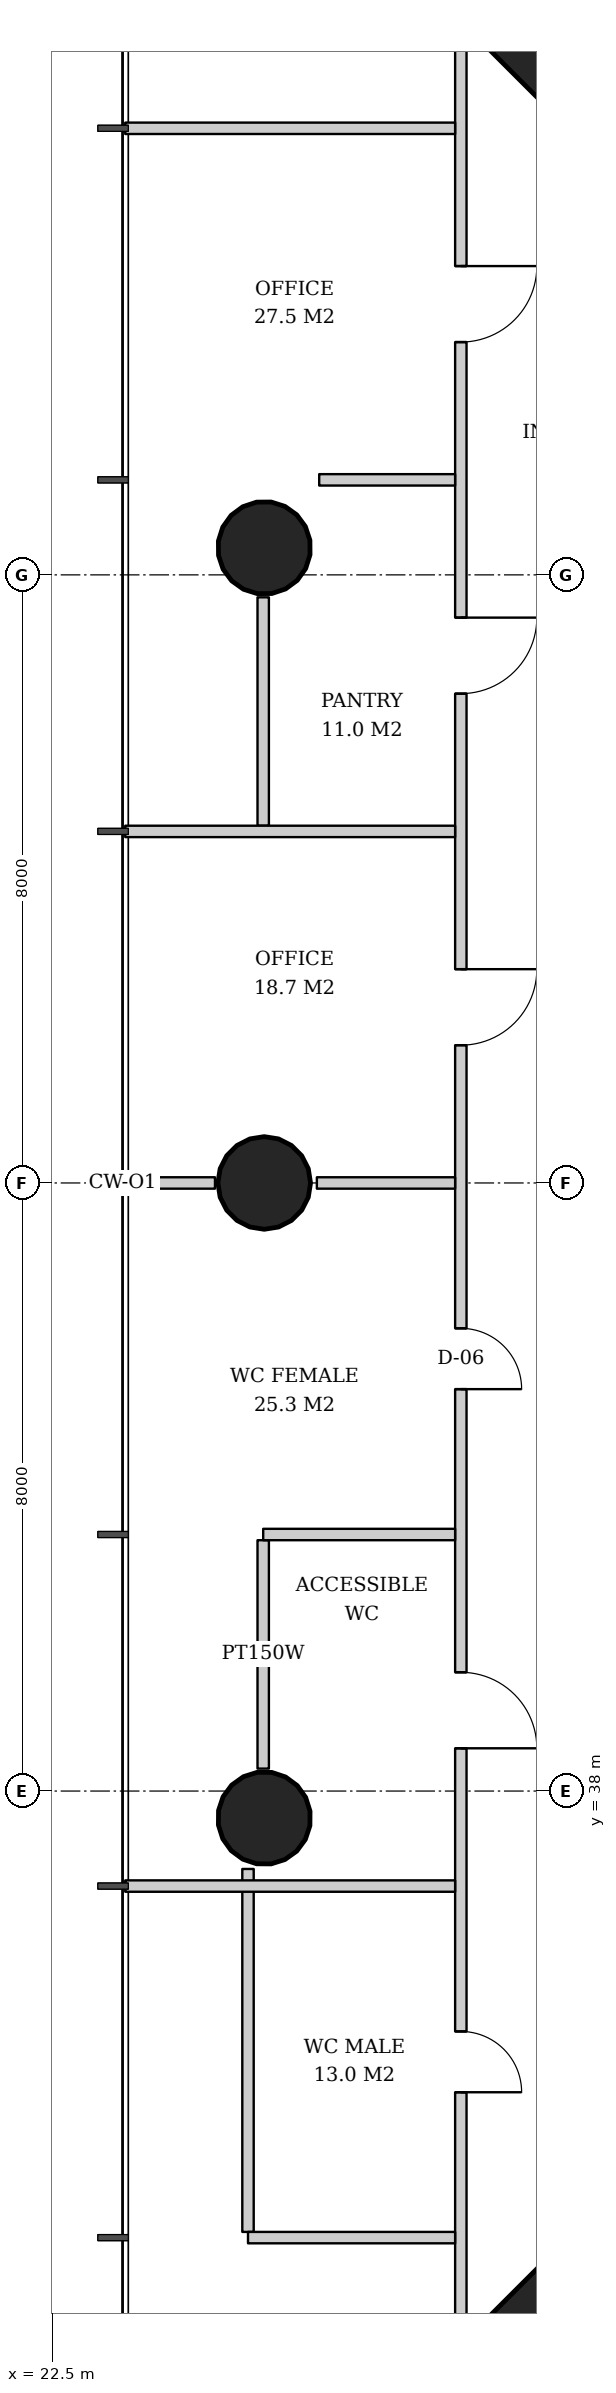
"""IFC4 building model, lengths in metres.
Left out: names, types, materials, properties, quantities, classifications, styles, units other than length and angle.
Written with IfcOpenShell. Run it as: python <this file> out.ifc"""

import sys

from ifc_helpers import new_model, si_unit, direction, frame, frame_2d, origin, origin_2d, place, context, subcontext, project, spatial, rectangle, hollow_circle, extrude, element, fill, save


model = new_model("IFC4")
c1 = context("Model", 3, precision=1e-05, world=origin(), true_north=direction((0.0, 1.0)))
c2 = subcontext(c1, "Body", "Model", "MODEL_VIEW")
j1 = project(units=[si_unit("LENGTHUNIT", "METRE"), si_unit("PLANEANGLEUNIT", "RADIAN")], contexts=[c1])
p1 = place(None, origin())
s1 = spatial("IfcSite", under=j1, at=p1, CompositionType="ELEMENT")
p2 = place(p1, origin())
s2 = spatial("IfcBuilding", under=s1, at=p2, CompositionType="ELEMENT")
p3 = place(p2, frame((0.0, 0.0, 154.0)))
s3 = spatial("IfcBuildingStorey", under=s2, at=p3, CompositionType="ELEMENT", Elevation=154.0)
for number, where, z_axis, x_axis in (
    (1, (29.35, 61.65, 0.0), (0.032, -0.032, 0.999), (0.707, 0.707, 0.0)),
    (2, (29.35, 30.35, 0.0), (0.032, 0.032, 0.999), (-0.707, 0.707, 0.0)),
):
    element("IfcColumn", number, at=place(p3, frame(where, z_axis=z_axis, x_axis=x_axis)), inside=s3, PredefinedType="COLUMN", context=c2, shape_type="SweptSolid", body=[
        extrude(rectangle(XDim=2.6, YDim=2.6, at=origin_2d()), origin(), (0.0, 0.0, 1.0), 3.804),
    ])
p4 = place(p3, frame((25.25, 54.375, 0.0), z_axis=(0.031910269556, -0.015987237665, 0.999362868496), x_axis=(0.447933021895, 0.894067115991, 0.0)))
e3 = element("IfcColumn", 3, at=p4, inside=s3, PredefinedType="COLUMN", context=c2, shape_type="SweptSolid", body=[
    extrude(hollow_circle(Radius=0.61, WallThickness=0.04, at=origin_2d()), origin(), (0.0, 0.0, 1.0), 3.802),
])
p5 = place(p3, frame((25.25, 46.0, 0.0), z_axis=(0.031914348339, 0.0, 0.999490607445), x_axis=(0.0, 1.0, 0.0)))
e4 = element("IfcColumn", 4, at=p5, inside=s3, PredefinedType="COLUMN", context=c2, shape_type="SweptSolid", body=[
    extrude(hollow_circle(Radius=0.61, WallThickness=0.04, at=origin_2d()), origin(), (0.0, 0.0, 1.0), 3.802),
])
p6 = place(p3, frame((25.25, 37.625, 0.0), z_axis=(0.031910269556, 0.015987237665, 0.999362868496), x_axis=(-0.447933021895, 0.894067115991, 0.0)))
e5 = element("IfcColumn", 5, at=p6, inside=s3, PredefinedType="COLUMN", context=c2, shape_type="SweptSolid", body=[
    extrude(hollow_circle(Radius=0.61, WallThickness=0.04, at=origin_2d()), origin(), (0.0, 0.0, 1.0), 3.802),
])
for number, where, z_axis, x_axis in (
    (6, (25.275, 53.705, 0.0), (0.0, 0.0, 1.0), (0.0, -1.0, 0.0)),
    (7, (25.275, 41.3, 0.0), (0.0, 0.0, 1.0), (0.0, -1.0, 0.0)),
):
    element("IfcWall", number, at=place(p3, frame(where, z_axis=z_axis, x_axis=x_axis)), inside=s3, PredefinedType="PARTITIONING", context=c2, shape_type="SweptSolid", body=[
        extrude(rectangle(XDim=3.005, YDim=0.15, at=frame_2d((1.502, 0.0))), origin(), (0.0, 0.0, 1.0), 3.52),
    ])
p7 = place(p3, frame((25.075, 36.975, 0.0), z_axis=(0.0, 0.0, 1.0), x_axis=(0.0, -1.0, 0.0)))
e8 = element("IfcWall", 8, at=p7, inside=s3, PredefinedType="PARTITIONING", context=c2, shape_type="SweptSolid", body=[
    extrude(rectangle(XDim=4.775, YDim=0.15, at=frame_2d((2.388, 0.0))), origin(), (0.0, 0.0, 1.0), 3.52),
])
p8 = place(p3, frame((27.875, 61.211, 0.0), z_axis=(0.0, 0.0, 1.0), x_axis=(0.0, -1.0, 0.0)))
e9 = element("IfcWall", 9, at=p8, inside=s3, PredefinedType="PARTITIONING", context=c2, shape_type="SweptSolid", body=[
    extrude(rectangle(XDim=30.423, YDim=0.15, at=frame_2d((15.211, 0.0))), origin(), (0.0, 0.0, 1.0), 2.706),
])
p9 = place(p8, frame((3.149, 0.0, 0.0)))
e10 = element("IfcOpeningElement", 10, at=p9, cuts=e9, PredefinedType="OPENING", context=c2, shape_type="SweptSolid", body=[
    extrude(rectangle(XDim=1.0, YDim=2.1, at=frame_2d((0.5, 1.05))), frame((0.0, 0.085, 0.0), z_axis=(0.0, -1.0, 0.0), x_axis=(1.0, 0.0, 0.0)), (0.0, 0.0, 1.0), 0.17),
])
p10 = place(p8, frame((7.774, 0.0, 0.0)))
e11 = element("IfcOpeningElement", 11, at=p10, cuts=e9, PredefinedType="OPENING", context=c2, shape_type="SweptSolid", body=[
    extrude(rectangle(XDim=1.0, YDim=2.1, at=frame_2d((0.5, 1.05))), frame((0.0, 0.085, 0.0), z_axis=(0.0, -1.0, 0.0), x_axis=(1.0, 0.0, 0.0)), (0.0, 0.0, 1.0), 0.17),
])
p11 = place(p8, frame((12.399, 0.0, 0.0)))
e12 = element("IfcOpeningElement", 12, at=p11, cuts=e9, PredefinedType="OPENING", context=c2, shape_type="SweptSolid", body=[
    extrude(rectangle(XDim=1.0, YDim=2.1, at=frame_2d((0.5, 1.05))), frame((0.0, 0.085, 0.0), z_axis=(0.0, -1.0, 0.0), x_axis=(1.0, 0.0, 0.0)), (0.0, 0.0, 1.0), 0.17),
])
p12 = place(p8, frame((17.124, 0.0, 0.0)))
e13 = element("IfcOpeningElement", 13, at=p12, cuts=e9, PredefinedType="OPENING", context=c2, shape_type="SweptSolid", body=[
    extrude(rectangle(XDim=0.8, YDim=2.1, at=frame_2d((0.4, 1.05))), frame((0.0, 0.085, 0.0), z_axis=(0.0, -1.0, 0.0), x_axis=(1.0, 0.0, 0.0)), (0.0, 0.0, 1.0), 0.17),
])
p13 = place(p8, frame((21.649, 0.0, 0.0)))
e14 = element("IfcOpeningElement", 14, at=p13, cuts=e9, PredefinedType="OPENING", context=c2, shape_type="SweptSolid", body=[
    extrude(rectangle(XDim=1.0, YDim=2.1, at=frame_2d((0.5, 1.05))), frame((0.0, 0.085, 0.0), z_axis=(0.0, -1.0, 0.0), x_axis=(1.0, 0.0, 0.0)), (0.0, 0.0, 1.0), 0.17),
])
p14 = place(p8, frame((26.374, 0.0, 0.0)))
e15 = element("IfcOpeningElement", 15, at=p14, cuts=e9, PredefinedType="OPENING", context=c2, shape_type="SweptSolid", body=[
    extrude(rectangle(XDim=0.8, YDim=2.1, at=frame_2d((0.4, 1.05))), frame((0.0, 0.085, 0.0), z_axis=(0.0, -1.0, 0.0), x_axis=(1.0, 0.0, 0.0)), (0.0, 0.0, 1.0), 0.17),
])
p15 = place(p3, frame((27.8, 59.875, 0.0), z_axis=(0.0, 0.0, 1.0), x_axis=(-1.0, 0.0, 0.0)))
e16 = element("IfcWall", 16, at=p15, inside=s3, PredefinedType="PARTITIONING", context=c2, shape_type="SweptSolid", body=[
    extrude(rectangle(XDim=4.34, YDim=0.15, at=frame_2d((2.17, 0.0))), origin(), (0.0, 0.0, 1.0), 3.12),
])
p16 = place(p3, frame((27.8, 55.25, 0.0), z_axis=(0.0, 0.0, 1.0), x_axis=(-1.0, 0.0, 0.0)))
e17 = element("IfcWall", 17, at=p16, inside=s3, PredefinedType="PARTITIONING", context=c2, shape_type="SweptSolid", body=[
    extrude(rectangle(XDim=1.788, YDim=0.15, at=frame_2d((0.894, 0.0))), origin(), (0.0, 0.0, 1.0), 3.52),
])
p17 = place(p3, frame((27.8, 50.625, 0.0), z_axis=(0.0, 0.0, 1.0), x_axis=(-1.0, 0.0, 0.0)))
e18 = element("IfcWall", 18, at=p17, inside=s3, PredefinedType="PARTITIONING", context=c2, shape_type="SweptSolid", body=[
    extrude(rectangle(XDim=4.34, YDim=0.15, at=frame_2d((2.17, 0.0))), origin(), (0.0, 0.0, 1.0), 2.706),
])
p18 = place(p3, frame((27.8, 46.0, 0.0), z_axis=(0.0, 0.0, 1.0), x_axis=(-1.0, 0.0, 0.0)))
e19 = element("IfcWall", 19, at=p18, inside=s3, PredefinedType="PARTITIONING", context=c2, shape_type="SweptSolid", body=[
    extrude(rectangle(XDim=1.819, YDim=0.15, at=frame_2d((0.91, 0.0))), origin(), (0.0, 0.0, 1.0), 3.52),
])
p19 = place(p3, frame((24.64, 46.0, 0.0), z_axis=(0.0, 0.0, 1.0), x_axis=(-1.0, 0.0, 0.0)))
e20 = element("IfcWall", 20, at=p19, inside=s3, PredefinedType="PARTITIONING", context=c2, shape_type="SweptSolid", body=[
    extrude(rectangle(XDim=1.18, YDim=0.15, at=frame_2d((0.59, 0.0))), origin(), (0.0, 0.0, 1.0), 3.52),
])
p20 = place(p3, frame((27.8, 41.375, 0.0), z_axis=(0.0, 0.0, 1.0), x_axis=(-1.0, 0.0, 0.0)))
e21 = element("IfcWall", 21, at=p20, inside=s3, PredefinedType="PARTITIONING", context=c2, shape_type="SweptSolid", body=[
    extrude(rectangle(XDim=2.525, YDim=0.15, at=frame_2d((1.263, 0.0))), origin(), (0.0, 0.0, 1.0), 3.52),
])
p21 = place(p3, frame((27.8, 36.75, 0.0), z_axis=(0.0, 0.0, 1.0), x_axis=(-1.0, 0.0, 0.0)))
e22 = element("IfcWall", 22, at=p21, inside=s3, PredefinedType="PARTITIONING", context=c2, shape_type="SweptSolid", body=[
    extrude(rectangle(XDim=4.34, YDim=0.15, at=frame_2d((2.17, 0.0))), origin(), (0.0, 0.0, 1.0), 3.52),
])
p22 = place(p3, frame((27.8, 32.125, 0.0), z_axis=(0.0, 0.0, 1.0), x_axis=(-1.0, 0.0, 0.0)))
e23 = element("IfcWall", 23, at=p22, inside=s3, PredefinedType="PARTITIONING", context=c2, shape_type="SweptSolid", body=[
    extrude(rectangle(XDim=2.725, YDim=0.15, at=frame_2d((1.363, 0.0))), origin(), (0.0, 0.0, 1.0), 3.52),
])
p23 = place(p9, origin())
e24 = element("IfcDoor", 24, at=p23, inside=s3, OperationType="SINGLE_SWING_LEFT", PredefinedType="DOOR", context=c2, shape_type="SweptSolid", body=[
    extrude(rectangle(XDim=1.0, YDim=2.1, at=frame_2d((0.5, 1.05))), frame((0.0, 0.025, 0.0), z_axis=(0.0, -1.0, 0.0), x_axis=(1.0, 0.0, 0.0)), (0.0, 0.0, 1.0), 0.05),
])
fill(e10, e24)
p24 = place(p10, origin())
e25 = element("IfcDoor", 25, at=p24, inside=s3, OperationType="SINGLE_SWING_LEFT", PredefinedType="DOOR", context=c2, shape_type="SweptSolid", body=[
    extrude(rectangle(XDim=1.0, YDim=2.1, at=frame_2d((0.5, 1.05))), frame((0.0, 0.025, 0.0), z_axis=(0.0, -1.0, 0.0), x_axis=(1.0, 0.0, 0.0)), (0.0, 0.0, 1.0), 0.05),
])
fill(e11, e25)
p25 = place(p11, origin())
e26 = element("IfcDoor", 26, at=p25, inside=s3, OperationType="SINGLE_SWING_LEFT", PredefinedType="DOOR", context=c2, shape_type="SweptSolid", body=[
    extrude(rectangle(XDim=1.0, YDim=2.1, at=frame_2d((0.5, 1.05))), frame((0.0, 0.025, 0.0), z_axis=(0.0, -1.0, 0.0), x_axis=(1.0, 0.0, 0.0)), (0.0, 0.0, 1.0), 0.05),
])
fill(e12, e26)
p26 = place(p12, origin())
e27 = element("IfcDoor", 27, at=p26, inside=s3, OperationType="SINGLE_SWING_RIGHT", PredefinedType="DOOR", context=c2, shape_type="SweptSolid", body=[
    extrude(rectangle(XDim=0.8, YDim=2.1, at=frame_2d((0.4, 1.05))), frame((0.0, 0.025, 0.0), z_axis=(0.0, -1.0, 0.0), x_axis=(1.0, 0.0, 0.0)), (0.0, 0.0, 1.0), 0.05),
])
fill(e13, e27)
p27 = place(p13, origin())
e28 = element("IfcDoor", 28, at=p27, inside=s3, OperationType="SINGLE_SWING_RIGHT", PredefinedType="DOOR", context=c2, shape_type="SweptSolid", body=[
    extrude(rectangle(XDim=1.0, YDim=2.1, at=frame_2d((0.5, 1.05))), frame((0.0, 0.025, 0.0), z_axis=(0.0, -1.0, 0.0), x_axis=(1.0, 0.0, 0.0)), (0.0, 0.0, 1.0), 0.05),
])
fill(e14, e28)
p28 = place(p14, origin())
e29 = element("IfcDoor", 29, at=p28, inside=s3, OperationType="SINGLE_SWING_RIGHT", PredefinedType="DOOR", context=c2, shape_type="SweptSolid", body=[
    extrude(rectangle(XDim=0.8, YDim=2.1, at=frame_2d((0.4, 1.05))), frame((0.0, 0.025, 0.0), z_axis=(0.0, -1.0, 0.0), x_axis=(1.0, 0.0, 0.0)), (0.0, 0.0, 1.0), 0.05),
])
fill(e15, e29)
save(model, sys.argv[1])
